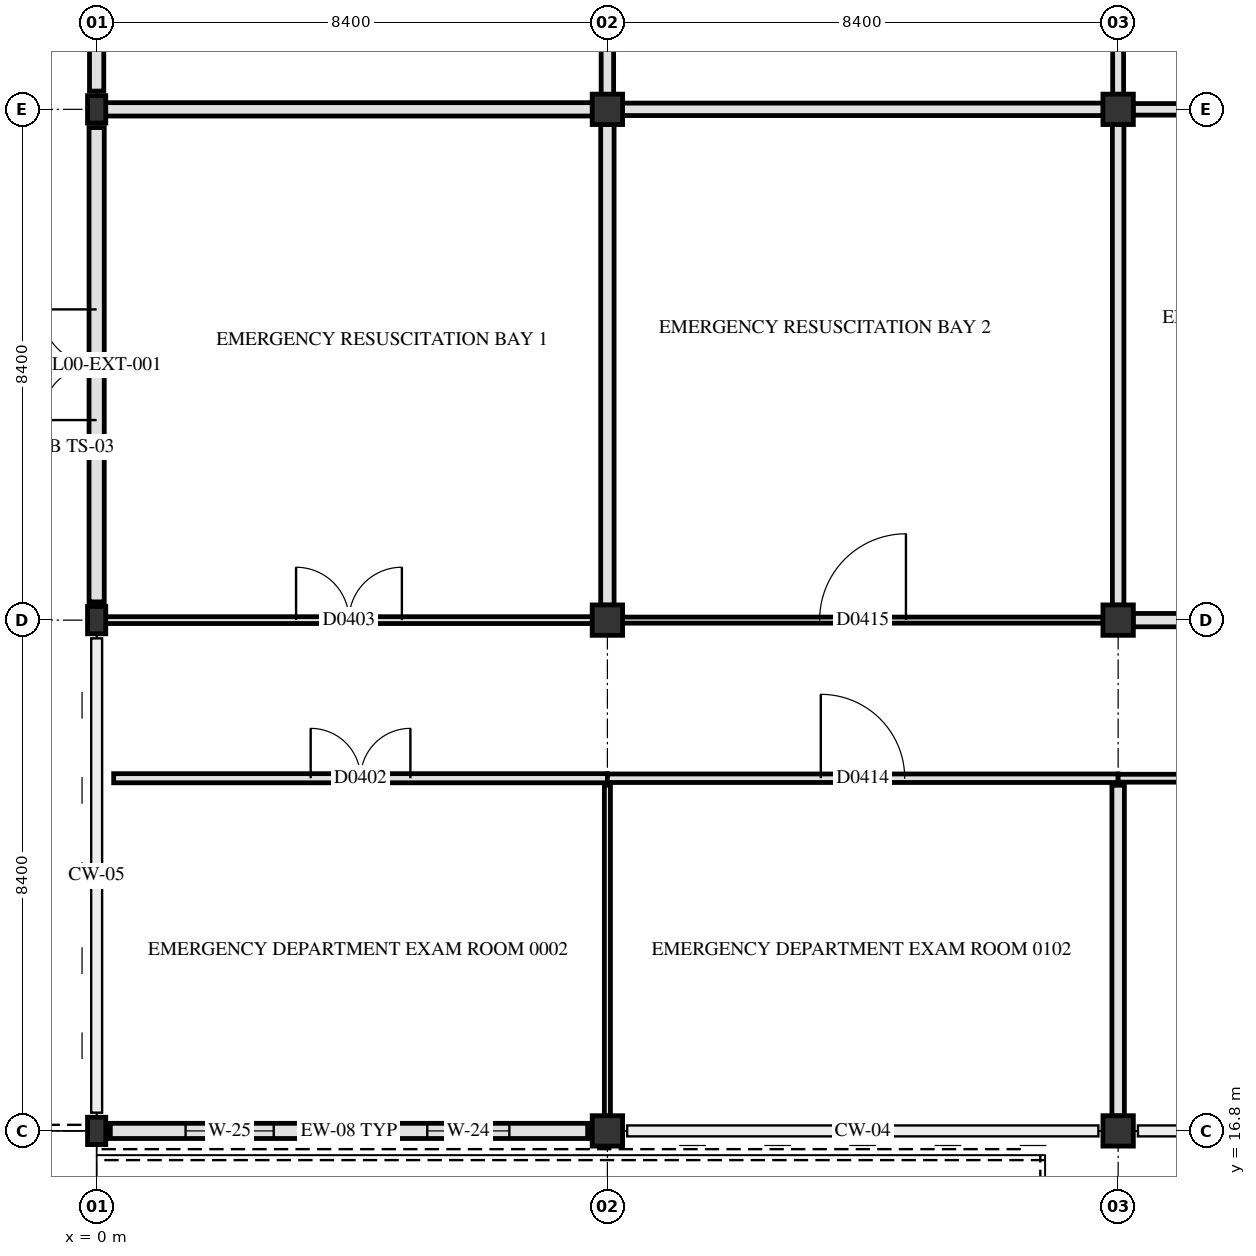
"""IFC4 building model, lengths in metres.
Left out: names, types, materials, properties, quantities, classifications, styles, units other than length and angle.
Written with IfcOpenShell. Run it as: python <this file> out.ifc"""

import sys

from ifc_helpers import new_model, si_unit, direction, frame, frame_2d, origin, origin_2d, place, context, subcontext, project, spatial, rectangle, i_section, extrude, element, fill, save


model = new_model("IFC4")
c1 = context("Model", 3, precision=1e-05, world=origin(), true_north=direction((0.0, 1.0)))
c2 = subcontext(c1, "Body", "Model", "MODEL_VIEW")
j1 = project(units=[si_unit("LENGTHUNIT", "METRE"), si_unit("PLANEANGLEUNIT", "RADIAN")], contexts=[c1])
p1 = place(None, origin())
s1 = spatial("IfcSite", under=j1, at=p1, CompositionType="ELEMENT")
p2 = place(p1, origin())
s2 = spatial("IfcBuilding", under=s1, at=p2, CompositionType="ELEMENT")
p3 = place(p2, origin())
s3 = spatial("IfcBuildingStorey", under=s2, at=p3, CompositionType="ELEMENT", Elevation=0.0)
for number, where, z_axis, x_axis in (
    (1, (0.0, 16.8, 0.0), (0.0, 0.0, 1.0), (1.0, 0.0, 0.0)),
    (2, (0.0, 25.2, 0.0), (0.0, 0.0, 1.0), (1.0, 0.0, 0.0)),
    (3, (0.0, 33.6, 0.0), (0.0, 0.0, 1.0), (1.0, 0.0, 0.0)),
):
    element("IfcColumn", number, at=place(p3, frame(where, z_axis=z_axis, x_axis=x_axis)), inside=s3, PredefinedType="COLUMN", context=c2, shape_type="SweptSolid", body=[
        extrude(i_section(OverallWidth=0.3, OverallDepth=0.45, WebThickness=0.014, FlangeThickness=0.026, FilletRadius=0.027, at=origin_2d()), origin(), (0.0, 0.0, 1.0), 4.8),
    ])
for number, where, z_axis, x_axis in (
    (4, (8.4, 16.8, 0.0), (0.0, 0.0, 1.0), (1.0, 0.0, 0.0)),
    (5, (8.4, 25.2, 0.0), (0.0, 0.0, 1.0), (1.0, 0.0, 0.0)),
    (6, (8.4, 33.6, 0.0), (0.0, 0.0, 1.0), (1.0, 0.0, 0.0)),
    (7, (16.8, 16.8, 0.0), (0.0, 0.0, 1.0), (1.0, 0.0, 0.0)),
    (8, (16.8, 25.2, 0.0), (0.0, 0.0, 1.0), (1.0, 0.0, 0.0)),
    (9, (16.8, 33.6, 0.0), (0.0, 0.0, 1.0), (1.0, 0.0, 0.0)),
):
    element("IfcColumn", number, at=place(p3, frame(where, z_axis=z_axis, x_axis=x_axis)), inside=s3, PredefinedType="COLUMN", context=c2, shape_type="SweptSolid", body=[
        extrude(rectangle(XDim=0.5, YDim=0.5, at=origin_2d()), origin(), (0.0, 0.0, 1.0), 4.8),
    ])
p4 = place(p3, frame((0.0, 25.5, 0.0), z_axis=(0.0, 0.0, 1.0), x_axis=(0.0, 1.0, 0.0)))
e10 = element("IfcWall", 10, at=p4, inside=s3, PredefinedType="SOLIDWALL", context=c2, shape_type="SweptSolid", body=[
    extrude(rectangle(XDim=7.8, YDim=0.25, at=frame_2d((3.9, 0.0))), origin(), (0.0, 0.0, 1.0), 3.79),
])
p5 = place(p4, frame((2.99, 0.0, 0.0)))
e11 = element("IfcOpeningElement", 11, at=p5, cuts=e10, PredefinedType="OPENING", context=c2, shape_type="SweptSolid", body=[
    extrude(rectangle(XDim=1.82, YDim=2.28, at=frame_2d((0.91, 1.14))), frame((0.0, 0.135, 0.0), z_axis=(0.0, -1.0, 0.0), x_axis=(1.0, 0.0, 0.0)), (0.0, 0.0, 1.0), 0.27),
])
p6 = place(p3, frame((0.0, 33.9, 0.0), z_axis=(0.0, 0.0, 1.0), x_axis=(0.0, 1.0, 0.0)))
e12 = element("IfcWall", 12, at=p6, inside=s3, PredefinedType="SOLIDWALL", context=c2, shape_type="SweptSolid", body=[
    extrude(rectangle(XDim=7.8, YDim=0.235, at=frame_2d((3.9, 0.0))), origin(), (0.0, 0.0, 1.0), 3.79),
])
p7 = place(p6, frame((2.8, 0.0, 0.0)))
e13 = element("IfcOpeningElement", 13, at=p7, cuts=e12, PredefinedType="OPENING", context=c2, shape_type="SweptSolid", body=[
    extrude(rectangle(XDim=2.2, YDim=2.35, at=frame_2d((1.1, 1.175))), frame((0.0, 0.127, 0.0), z_axis=(0.0, -1.0, 0.0), x_axis=(1.0, 0.0, 0.0)), (0.0, 0.0, 1.0), 0.255),
])
p8 = place(p3, frame((8.075, 16.8, 0.0), z_axis=(0.0, 0.0, 1.0), x_axis=(-1.0, 0.0, 0.0)))
e14 = element("IfcWall", 14, at=p8, inside=s3, PredefinedType="SOLIDWALL", context=c2, shape_type="SweptSolid", body=[
    extrude(rectangle(XDim=7.85, YDim=0.25, at=frame_2d((3.925, 0.0))), origin(), (0.0, 0.0, 1.0), 3.79),
])
p9 = place(p8, frame((1.288, 0.0, 0.85)))
e15 = element("IfcOpeningElement", 15, at=p9, cuts=e14, PredefinedType="OPENING", context=c2, shape_type="SweptSolid", body=[
    extrude(rectangle(XDim=1.35, YDim=1.54, at=frame_2d((0.675, 0.77))), frame((0.0, 0.135, 0.0), z_axis=(0.0, -1.0, 0.0), x_axis=(1.0, 0.0, 0.0)), (0.0, 0.0, 1.0), 0.27),
])
p10 = place(p8, frame((5.163, 0.0, 0.85)))
e16 = element("IfcOpeningElement", 16, at=p10, cuts=e14, PredefinedType="OPENING", context=c2, shape_type="SweptSolid", body=[
    extrude(rectangle(XDim=1.45, YDim=1.54, at=frame_2d((0.725, 0.77))), frame((0.0, 0.135, 0.0), z_axis=(0.0, -1.0, 0.0), x_axis=(1.0, 0.0, 0.0)), (0.0, 0.0, 1.0), 0.27),
])
p11 = place(p3, frame((0.28, 22.6, 0.0), z_axis=(0.0, 0.0, 1.0), x_axis=(1.0, 0.0, 0.0)))
e17 = element("IfcWall", 17, at=p11, inside=s3, PredefinedType="PARTITIONING", context=c2, shape_type="SweptSolid", body=[
    extrude(rectangle(XDim=8.12, YDim=0.15, at=frame_2d((4.06, 0.0))), origin(), (0.0, 0.0, 1.0), 3.89),
])
p12 = place(p11, frame((3.24, 0.0, 0.0)))
e18 = element("IfcOpeningElement", 18, at=p12, cuts=e17, PredefinedType="OPENING", context=c2, shape_type="SweptSolid", body=[
    extrude(rectangle(XDim=1.64, YDim=2.28, at=frame_2d((0.82, 1.14))), frame((0.0, 0.085, 0.0), z_axis=(0.0, -1.0, 0.0), x_axis=(1.0, 0.0, 0.0)), (0.0, 0.0, 1.0), 0.17),
])
p13 = place(p3, frame((8.4, 22.6, 0.0), z_axis=(0.0, 0.0, 1.0), x_axis=(1.0, 0.0, 0.0)))
e19 = element("IfcWall", 19, at=p13, inside=s3, PredefinedType="PARTITIONING", context=c2, shape_type="SweptSolid", body=[
    extrude(rectangle(XDim=8.4, YDim=0.14, at=frame_2d((4.2, 0.0))), origin(), (0.0, 0.0, 1.0), 3.89),
])
p14 = place(p13, frame((3.51, 0.0, 0.0)))
e20 = element("IfcOpeningElement", 20, at=p14, cuts=e19, PredefinedType="OPENING", context=c2, shape_type="SweptSolid", body=[
    extrude(rectangle(XDim=1.38, YDim=2.22, at=frame_2d((0.69, 1.11))), frame((0.0, 0.08, 0.0), z_axis=(0.0, -1.0, 0.0), x_axis=(1.0, 0.0, 0.0)), (0.0, 0.0, 1.0), 0.16),
])
p15 = place(p3, frame((16.8, 22.6, 0.0), z_axis=(0.0, 0.0, 1.0), x_axis=(1.0, 0.0, 0.0)))
e21 = element("IfcWall", 21, at=p15, inside=s3, PredefinedType="PARTITIONING", context=c2, shape_type="SweptSolid", body=[
    extrude(rectangle(XDim=5.95, YDim=0.13, at=frame_2d((2.975, 0.0))), origin(), (0.0, 0.0, 1.0), 3.89),
])
p16 = place(p15, frame((2.5, 0.0, 0.0)))
e22 = element("IfcOpeningElement", 22, at=p16, cuts=e21, PredefinedType="OPENING", context=c2, shape_type="SweptSolid", body=[
    extrude(rectangle(XDim=0.95, YDim=2.1, at=frame_2d((0.475, 1.05))), frame((0.0, 0.075, 0.0), z_axis=(0.0, -1.0, 0.0), x_axis=(1.0, 0.0, 0.0)), (0.0, 0.0, 1.0), 0.15),
])
p17 = place(p3, frame((0.145, 25.2, 0.0), z_axis=(0.0, 0.0, 1.0), x_axis=(1.0, 0.0, 0.0)))
e23 = element("IfcWall", 23, at=p17, inside=s3, PredefinedType="PARTITIONING", context=c2, shape_type="SweptSolid", body=[
    extrude(rectangle(XDim=8.01, YDim=0.112, at=frame_2d((4.005, 0.0))), origin(), (0.0, 0.0, 1.0), 3.84),
])
p18 = place(p17, frame((3.135, 0.0, 0.0)))
e24 = element("IfcOpeningElement", 24, at=p18, cuts=e23, PredefinedType="OPENING", context=c2, shape_type="SweptSolid", body=[
    extrude(rectangle(XDim=1.74, YDim=2.24, at=frame_2d((0.87, 1.12))), frame((0.0, 0.066, 0.0), z_axis=(0.0, -1.0, 0.0), x_axis=(1.0, 0.0, 0.0)), (0.0, 0.0, 1.0), 0.132),
])
p19 = place(p3, frame((8.645, 25.2, 0.0), z_axis=(0.0, 0.0, 1.0), x_axis=(1.0, 0.0, 0.0)))
e25 = element("IfcWall", 25, at=p19, inside=s3, PredefinedType="PARTITIONING", context=c2, shape_type="SweptSolid", body=[
    extrude(rectangle(XDim=7.91, YDim=0.1, at=frame_2d((3.955, 0.0))), origin(), (0.0, 0.0, 1.0), 3.84),
])
p20 = place(p19, frame((3.245, 0.0, 0.0)))
e26 = element("IfcOpeningElement", 26, at=p20, cuts=e25, PredefinedType="OPENING", context=c2, shape_type="SweptSolid", body=[
    extrude(rectangle(XDim=1.42, YDim=2.22, at=frame_2d((0.71, 1.11))), frame((0.0, 0.06, 0.0), z_axis=(0.0, -1.0, 0.0), x_axis=(1.0, 0.0, 0.0)), (0.0, 0.0, 1.0), 0.12),
])
p21 = place(p3, frame((17.045, 25.2, 0.0), z_axis=(0.0, 0.0, 1.0), x_axis=(1.0, 0.0, 0.0)))
e27 = element("IfcWall", 27, at=p21, inside=s3, PredefinedType="PARTITIONING", context=c2, shape_type="SweptSolid", body=[
    extrude(rectangle(XDim=5.705, YDim=0.22, at=frame_2d((2.853, 0.0))), origin(), (0.0, 0.0, 1.0), 3.84),
])
p22 = place(p21, frame((2.302, 0.0, 0.0)))
e28 = element("IfcOpeningElement", 28, at=p22, cuts=e27, PredefinedType="OPENING", context=c2, shape_type="SweptSolid", body=[
    extrude(rectangle(XDim=1.1, YDim=2.15, at=frame_2d((0.55, 1.075))), frame((0.0, 0.12, 0.0), z_axis=(0.0, -1.0, 0.0), x_axis=(1.0, 0.0, 0.0)), (0.0, 0.0, 1.0), 0.24),
])
p23 = place(p3, frame((0.145, 33.6, 0.0), z_axis=(0.0, 0.0, 1.0), x_axis=(1.0, 0.0, 0.0)))
e29 = element("IfcWall", 29, at=p23, inside=s3, PredefinedType="PARTITIONING", context=c2, shape_type="SweptSolid", body=[
    extrude(rectangle(XDim=8.01, YDim=0.22, at=frame_2d((4.005, 0.0))), origin(), (0.0, 0.0, 1.0), 3.84),
])
p24 = place(p3, frame((8.645, 33.6, 0.0), z_axis=(0.0, 0.0, 1.0), x_axis=(1.0, 0.0, 0.0)))
e30 = element("IfcWall", 30, at=p24, inside=s3, PredefinedType="PARTITIONING", context=c2, shape_type="SweptSolid", body=[
    extrude(rectangle(XDim=7.91, YDim=0.205, at=frame_2d((3.955, 0.0))), origin(), (0.0, 0.0, 1.0), 3.84),
])
p25 = place(p3, frame((17.045, 33.6, 0.0), z_axis=(0.0, 0.0, 1.0), x_axis=(1.0, 0.0, 0.0)))
e31 = element("IfcWall", 31, at=p25, inside=s3, PredefinedType="PARTITIONING", context=c2, shape_type="SweptSolid", body=[
    extrude(rectangle(XDim=7.91, YDim=0.19, at=frame_2d((3.955, 0.0))), origin(), (0.0, 0.0, 1.0), 3.84),
])
p26 = place(p3, frame((8.4, 17.045, 0.0), z_axis=(0.0, 0.0, 1.0), x_axis=(0.0, 1.0, 0.0)))
e32 = element("IfcWall", 32, at=p26, inside=s3, PredefinedType="PARTITIONING", context=c2, shape_type="SweptSolid", body=[
    extrude(rectangle(XDim=5.44, YDim=0.1, at=frame_2d((2.72, 0.0))), origin(), (0.0, 0.0, 1.0), 3.89),
])
p27 = place(p3, frame((8.4, 25.445, 0.0), z_axis=(0.0, 0.0, 1.0), x_axis=(0.0, 1.0, 0.0)))
e33 = element("IfcWall", 33, at=p27, inside=s3, PredefinedType="PARTITIONING", context=c2, shape_type="SweptSolid", body=[
    extrude(rectangle(XDim=7.91, YDim=0.22, at=frame_2d((3.955, 0.0))), origin(), (0.0, 0.0, 1.0), 3.89),
])
p28 = place(p3, frame((8.4, 33.845, 0.0), z_axis=(0.0, 0.0, 1.0), x_axis=(0.0, 1.0, 0.0)))
e34 = element("IfcWall", 34, at=p28, inside=s3, PredefinedType="PARTITIONING", context=c2, shape_type="SweptSolid", body=[
    extrude(rectangle(XDim=7.91, YDim=0.205, at=frame_2d((3.955, 0.0))), origin(), (0.0, 0.0, 1.0), 3.89),
])
p29 = place(p3, frame((16.8, 17.045, 0.0), z_axis=(0.0, 0.0, 1.0), x_axis=(0.0, 1.0, 0.0)))
e35 = element("IfcWall", 35, at=p29, inside=s3, PredefinedType="PARTITIONING", context=c2, shape_type="SweptSolid", body=[
    extrude(rectangle(XDim=5.44, YDim=0.205, at=frame_2d((2.72, 0.0))), origin(), (0.0, 0.0, 1.0), 3.89),
])
p30 = place(p3, frame((16.8, 25.445, 0.0), z_axis=(0.0, 0.0, 1.0), x_axis=(0.0, 1.0, 0.0)))
e36 = element("IfcWall", 36, at=p30, inside=s3, PredefinedType="PARTITIONING", context=c2, shape_type="SweptSolid", body=[
    extrude(rectangle(XDim=7.91, YDim=0.19, at=frame_2d((3.955, 0.0))), origin(), (0.0, 0.0, 1.0), 3.89),
])
p31 = place(p3, frame((16.8, 33.845, 0.0), z_axis=(0.0, 0.0, 1.0), x_axis=(0.0, 1.0, 0.0)))
e37 = element("IfcWall", 37, at=p31, inside=s3, PredefinedType="PARTITIONING", context=c2, shape_type="SweptSolid", body=[
    extrude(rectangle(XDim=7.91, YDim=0.18, at=frame_2d((3.955, 0.0))), origin(), (0.0, 0.0, 1.0), 3.89),
])
p32 = place(p5, origin())
e38 = element("IfcDoor", 38, at=p32, inside=s3, OperationType="DOUBLE_SWING_LEFT", PredefinedType="DOOR", context=c2, shape_type="SweptSolid", body=[
    extrude(rectangle(XDim=1.82, YDim=2.28, at=frame_2d((0.91, 1.14))), frame((0.0, 0.025, 0.0), z_axis=(0.0, -1.0, 0.0), x_axis=(1.0, 0.0, 0.0)), (0.0, 0.0, 1.0), 0.05),
])
fill(e11, e38)
p33 = place(p9, origin())
e39 = element("IfcWindow", 39, at=p33, inside=s3, PartitioningType="SINGLE_PANEL", PredefinedType="WINDOW", context=c2, shape_type="SweptSolid", body=[
    extrude(rectangle(XDim=1.35, YDim=1.54, at=frame_2d((0.675, 0.77))), frame((0.0, 0.03, 0.0), z_axis=(0.0, -1.0, 0.0), x_axis=(1.0, 0.0, 0.0)), (0.0, 0.0, 1.0), 0.06),
])
fill(e15, e39)
p34 = place(p10, origin())
e40 = element("IfcWindow", 40, at=p34, inside=s3, PartitioningType="SINGLE_PANEL", PredefinedType="WINDOW", context=c2, shape_type="SweptSolid", body=[
    extrude(rectangle(XDim=1.45, YDim=1.54, at=frame_2d((0.725, 0.77))), frame((0.0, 0.03, 0.0), z_axis=(0.0, -1.0, 0.0), x_axis=(1.0, 0.0, 0.0)), (0.0, 0.0, 1.0), 0.06),
])
fill(e16, e40)
p35 = place(p12, origin())
e41 = element("IfcDoor", 41, at=p35, inside=s3, OperationType="DOUBLE_SWING_LEFT", PredefinedType="DOOR", context=c2, shape_type="SweptSolid", body=[
    extrude(rectangle(XDim=1.64, YDim=2.28, at=frame_2d((0.82, 1.14))), frame((0.0, 0.025, 0.0), z_axis=(0.0, -1.0, 0.0), x_axis=(1.0, 0.0, 0.0)), (0.0, 0.0, 1.0), 0.05),
])
fill(e18, e41)
p36 = place(p18, origin())
e42 = element("IfcDoor", 42, at=p36, inside=s3, OperationType="DOUBLE_SWING_RIGHT", PredefinedType="DOOR", context=c2, shape_type="SweptSolid", body=[
    extrude(rectangle(XDim=1.74, YDim=2.24, at=frame_2d((0.87, 1.12))), frame((0.0, 0.025, 0.0), z_axis=(0.0, -1.0, 0.0), x_axis=(1.0, 0.0, 0.0)), (0.0, 0.0, 1.0), 0.05),
])
fill(e24, e42)
p37 = place(p14, origin())
e43 = element("IfcDoor", 43, at=p37, inside=s3, OperationType="SINGLE_SWING_LEFT", PredefinedType="DOOR", context=c2, shape_type="SweptSolid", body=[
    extrude(rectangle(XDim=1.38, YDim=2.22, at=frame_2d((0.69, 1.11))), frame((0.0, 0.025, 0.0), z_axis=(0.0, -1.0, 0.0), x_axis=(1.0, 0.0, 0.0)), (0.0, 0.0, 1.0), 0.05),
])
fill(e20, e43)
p38 = place(p20, origin())
e44 = element("IfcDoor", 44, at=p38, inside=s3, OperationType="SINGLE_SWING_RIGHT", PredefinedType="DOOR", context=c2, shape_type="SweptSolid", body=[
    extrude(rectangle(XDim=1.42, YDim=2.22, at=frame_2d((0.71, 1.11))), frame((0.0, 0.025, 0.0), z_axis=(0.0, -1.0, 0.0), x_axis=(1.0, 0.0, 0.0)), (0.0, 0.0, 1.0), 0.05),
])
fill(e26, e44)
save(model, sys.argv[1])
